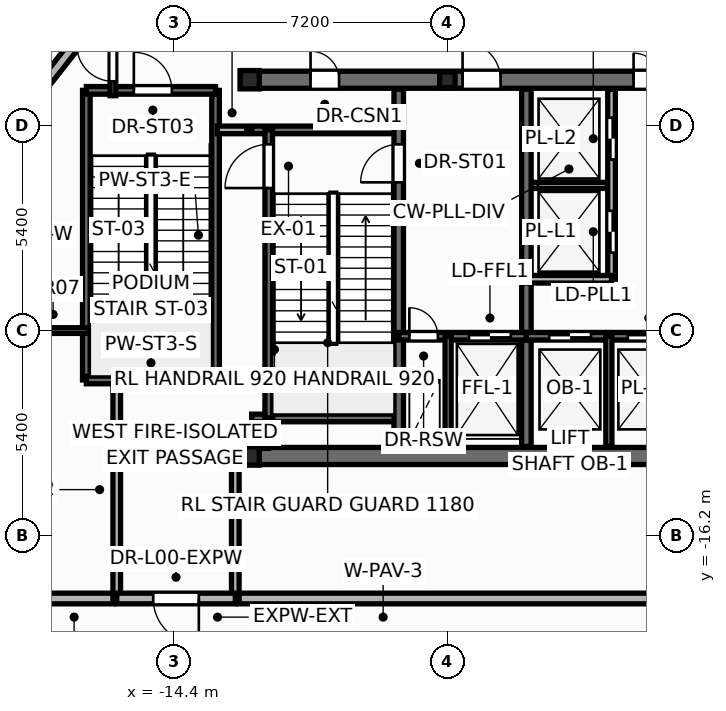
"""IFC4 building model, lengths in metres.
Left out: names, types, materials, properties, quantities, classifications, styles, units other than length and angle.
Written with IfcOpenShell. Run it as: python <this file> out.ifc"""

import sys

from ifc_helpers import new_model, si_unit, direction, frame, frame_2d, origin, origin_2d, place, context, subcontext, project, spatial, rectangle, i_section, extrude, element, fill, save


model = new_model("IFC4")
c1 = context("Model", 3, precision=1e-05, world=origin(), true_north=direction((0.0, 1.0)))
c2 = subcontext(c1, "Body", "Model", "MODEL_VIEW")
j1 = project(units=[si_unit("LENGTHUNIT", "METRE"), si_unit("PLANEANGLEUNIT", "RADIAN")], contexts=[c1])
p1 = place(None, origin())
s1 = spatial("IfcSite", under=j1, at=p1, CompositionType="ELEMENT")
p2 = place(p1, origin())
s2 = spatial("IfcBuilding", under=s1, at=p2, CompositionType="ELEMENT")
p3 = place(p2, origin())
s3 = spatial("IfcBuildingStorey", under=s2, at=p3, CompositionType="ELEMENT", Elevation=0.0)
for number, where, z_axis, x_axis in (
    (1, (-12.4, -14.1, 0.0), (0.0, 0.0, 1.0), (1.0, 0.0, 0.0)),
    (2, (-12.4, -4.2, 0.0), (0.0, 0.0, 1.0), (1.0, 0.0, 0.0)),
):
    element("IfcColumn", number, at=place(p3, frame(where, z_axis=z_axis, x_axis=x_axis)), inside=s3, PredefinedType="COLUMN", context=c2, shape_type="SweptSolid", body=[
        extrude(i_section(OverallWidth=0.5, OverallDepth=0.482, WebThickness=0.04, FlangeThickness=0.045, at=origin_2d()), origin(), (0.0, 0.0, 1.0), 5.4),
    ])
p4 = place(p3, frame((-7.2, -4.2, 0.0), z_axis=(0.0, 0.0, 1.0), x_axis=(1.0, 0.0, 0.0)))
e3 = element("IfcColumn", 3, at=p4, inside=s3, PredefinedType="PILASTER", context=c2, shape_type="SweptSolid", body=[
    extrude(i_section(OverallWidth=0.405, OverallDepth=0.414, WebThickness=0.022, FlangeThickness=0.032, at=origin_2d()), origin(), (0.0, 0.0, 1.0), 5.4),
])
p5 = place(p3, frame((-15.98, -17.85, -0.015), z_axis=(0.0, 0.0, 1.0), x_axis=(-1.0, 0.0, 0.0)))
e4 = element("IfcWall", 4, at=p5, inside=s3, PredefinedType="STANDARD", context=c2, shape_type="SweptSolid", body=[
    extrude(rectangle(XDim=2.083, YDim=0.28, at=frame_2d((1.042, 0.0))), origin(), (0.0, 0.0, 1.0), 5.135),
])
p6 = place(p3, frame((12.7, -17.85, -0.015), z_axis=(0.0, 0.0, 1.0), x_axis=(-1.0, 0.0, 0.0)))
e5 = element("IfcWall", 5, at=p6, inside=s3, PredefinedType="STANDARD", context=c2, shape_type="SweptSolid", body=[
    extrude(rectangle(XDim=25.4, YDim=0.28, at=frame_2d((12.7, 0.0))), origin(), (0.0, 0.0, 1.0), 4.498),
])
p7 = place(p6, frame((2.97, 0.0, 0.015)))
e6 = element("IfcOpeningElement", 6, at=p7, cuts=e5, PredefinedType="OPENING", context=c2, shape_type="SweptSolid", body=[
    extrude(rectangle(XDim=2.006, YDim=2.304, at=frame_2d((1.0, 1.152))), frame((0.0, 0.15, 0.0), z_axis=(0.0, -1.0, 0.0), x_axis=(1.0, 0.0, 0.0)), (0.0, 0.0, 1.0), 0.3),
])
p8 = place(p3, frame((-23.245, -11.24, -0.015), z_axis=(0.0, 0.0, 1.0), x_axis=(0.616945483616, 0.787005889588, 0.0)))
e7 = element("IfcWall", 7, at=p8, inside=s3, PredefinedType="STANDARD", context=c2, shape_type="SweptSolid", body=[
    extrude(rectangle(XDim=28.627, YDim=0.28, at=frame_2d((14.314, 0.0))), origin(), (0.0, 0.0, 1.0), 3.91),
])
p9 = place(p3, frame((-5.12, -6.98, 0.0), z_axis=(0.0, 0.0, 1.0), x_axis=(1.0, 0.0, 0.0)))
e8 = element("IfcWall", 8, at=p9, inside=s3, PredefinedType="PARTITIONING", context=c2, shape_type="SweptSolid", body=[
    extrude(rectangle(XDim=2.24, YDim=0.16, at=frame_2d((1.12, 0.0))), origin(), (0.0, 0.0, 1.0), 5.12),
])
p10 = place(p3, frame((-12.75, -14.1, 0.0), z_axis=(0.0, 0.0, 1.0), x_axis=(1.0, 0.0, 0.0)))
e9 = element("IfcWall", 9, at=p10, inside=s3, PredefinedType="SHEAR", context=c2, shape_type="SweptSolid", body=[
    extrude(rectangle(XDim=25.5, YDim=0.45, at=frame_2d((12.75, 0.0))), origin(), (0.0, 0.0, 1.0), 5.4),
])
p11 = place(p3, frame((-12.65, -4.2, 0.0), z_axis=(0.0, 0.0, 1.0), x_axis=(1.0, 0.0, 0.0)))
e10 = element("IfcWall", 10, at=p11, inside=s3, PredefinedType="SHEAR", context=c2, shape_type="SweptSolid", body=[
    extrude(rectangle(XDim=25.3, YDim=0.45, at=frame_2d((12.65, 0.0))), origin(), (0.0, 0.0, 1.0), 5.4),
])
p12 = place(p11, frame((1.85, 0.0, 0.0)))
e11 = element("IfcOpeningElement", 11, at=p12, cuts=e10, PredefinedType="OPENING", context=c2, shape_type="SweptSolid", body=[
    extrude(rectangle(XDim=0.756, YDim=2.054, at=frame_2d((0.375, 1.027))), frame((0.0, 0.235, 0.0), z_axis=(0.0, -1.0, 0.0), x_axis=(1.0, 0.0, 0.0)), (0.0, 0.0, 1.0), 0.47),
])
p13 = place(p11, frame((22.65, 0.0, 0.0)))
e12 = element("IfcOpeningElement", 12, at=p13, cuts=e10, PredefinedType="OPENING", context=c2, shape_type="SweptSolid", body=[
    extrude(rectangle(XDim=0.756, YDim=2.054, at=frame_2d((0.375, 1.027))), frame((0.0, 0.235, 0.0), z_axis=(0.0, -1.0, 0.0), x_axis=(1.0, 0.0, 0.0)), (0.0, 0.0, 1.0), 0.47),
])
p14 = place(p11, frame((5.85, 0.0, 0.0)))
e13 = element("IfcOpeningElement", 13, at=p14, cuts=e10, PredefinedType="OPENING", context=c2, shape_type="SweptSolid", body=[
    extrude(rectangle(XDim=1.006, YDim=2.104, at=frame_2d((0.5, 1.052))), frame((0.0, 0.235, 0.0), z_axis=(0.0, -1.0, 0.0), x_axis=(1.0, 0.0, 0.0)), (0.0, 0.0, 1.0), 0.47),
])
p15 = place(p11, frame((10.35, 0.0, 0.0)))
e14 = element("IfcOpeningElement", 14, at=p15, cuts=e10, PredefinedType="OPENING", context=c2, shape_type="SweptSolid", body=[
    extrude(rectangle(XDim=1.406, YDim=2.154, at=frame_2d((0.7, 1.077))), frame((0.0, 0.235, 0.0), z_axis=(0.0, -1.0, 0.0), x_axis=(1.0, 0.0, 0.0)), (0.0, 0.0, 1.0), 0.47),
])
p16 = place(p11, frame((18.45, 0.0, 0.0)))
e15 = element("IfcOpeningElement", 15, at=p16, cuts=e10, PredefinedType="OPENING", context=c2, shape_type="SweptSolid", body=[
    extrude(rectangle(XDim=1.006, YDim=2.104, at=frame_2d((0.5, 1.052))), frame((0.0, 0.235, 0.0), z_axis=(0.0, -1.0, 0.0), x_axis=(1.0, 0.0, 0.0)), (0.0, 0.0, 1.0), 0.47),
])
for number, where, z_axis, x_axis in (
    (16, (-12.35, -5.52, 0.0), (0.0, 0.0, 1.0), (1.0, 0.0, 0.0)),
    (17, (-12.35, -13.1, 0.0), (0.0, 0.0, 1.0), (1.0, 0.0, 0.0)),
):
    element("IfcWall", number, at=place(p3, frame(where, z_axis=z_axis, x_axis=x_axis)), inside=s3, PredefinedType="SOLIDWALL", context=c2, shape_type="SweptSolid", body=[
        extrude(rectangle(XDim=3.87, YDim=0.2, at=frame_2d((1.935, 0.0))), origin(), (0.0, 0.0, 1.0), 5.4),
    ])
p17 = place(p3, frame((-11.9, -13.1, 0.0), z_axis=(0.0, 0.0, 1.0), x_axis=(0.0, 1.0, 0.0)))
e18 = element("IfcWall", 18, at=p17, inside=s3, PredefinedType="SOLIDWALL", context=c2, shape_type="SweptSolid", body=[
    extrude(rectangle(XDim=7.58, YDim=0.2, at=frame_2d((3.79, 0.0))), origin(), (0.0, 0.0, 1.0), 5.4),
])
p18 = place(p17, frame((6.05, 0.0, 0.0)))
e19 = element("IfcOpeningElement", 19, at=p18, cuts=e18, PredefinedType="OPENING", context=c2, shape_type="SweptSolid", body=[
    extrude(rectangle(XDim=1.156, YDim=2.154, at=frame_2d((0.575, 1.077))), frame((0.0, 0.11, 0.0), z_axis=(0.0, -1.0, 0.0), x_axis=(1.0, 0.0, 0.0)), (0.0, 0.0, 1.0), 0.22),
])
p19 = place(p3, frame((-8.48, -13.85, 0.0), z_axis=(0.0, 0.0, 1.0), x_axis=(0.0, 1.0, 0.0)))
e20 = element("IfcWall", 20, at=p19, inside=s3, PredefinedType="SHEAR", context=c2, shape_type="SweptSolid", body=[
    extrude(rectangle(XDim=9.4, YDim=0.25, at=frame_2d((4.7, 0.0))), origin(), (0.0, 0.0, 1.0), 5.4),
])
p20 = place(p19, frame((6.95, 0.0, 0.0)))
e21 = element("IfcOpeningElement", 21, at=p20, cuts=e20, PredefinedType="OPENING", context=c2, shape_type="SweptSolid", body=[
    extrude(rectangle(XDim=1.006, YDim=2.104, at=frame_2d((0.5, 1.052))), frame((0.0, 0.135, 0.0), z_axis=(0.0, -1.0, 0.0), x_axis=(1.0, 0.0, 0.0)), (0.0, 0.0, 1.0), 0.27),
])
p21 = place(p3, frame((-5.12, -13.85, 0.0), z_axis=(0.0, 0.0, 1.0), x_axis=(0.0, 1.0, 0.0)))
e22 = element("IfcWall", 22, at=p21, inside=s3, PredefinedType="SHEAR", context=c2, shape_type="SweptSolid", body=[
    extrude(rectangle(XDim=9.4, YDim=0.25, at=frame_2d((4.7, 0.0))), origin(), (0.0, 0.0, 1.0), 5.4),
])
p22 = place(p3, frame((-8.48, -10.95, 0.0), z_axis=(0.0, 0.0, 1.0), x_axis=(1.0, 0.0, 0.0)))
e23 = element("IfcWall", 23, at=p22, inside=s3, PredefinedType="SOLIDWALL", context=c2, shape_type="SweptSolid", body=[
    extrude(rectangle(XDim=3.36, YDim=0.2, at=frame_2d((1.68, 0.0))), origin(), (0.0, 0.0, 1.0), 5.4),
])
p23 = place(p22, frame((0.28, 0.0, 0.0)))
e24 = element("IfcOpeningElement", 24, at=p23, cuts=e23, PredefinedType="OPENING", context=c2, shape_type="SweptSolid", body=[
    extrude(rectangle(XDim=0.756, YDim=2.054, at=frame_2d((0.375, 1.027))), frame((0.0, 0.11, 0.0), z_axis=(0.0, -1.0, 0.0), x_axis=(1.0, 0.0, 0.0)), (0.0, 0.0, 1.0), 0.22),
])
p24 = place(p22, frame((1.85, 0.0, 0.0)))
e25 = element("IfcOpeningElement", 25, at=p24, cuts=e23, PredefinedType="OPENING", context=c2, shape_type="SweptSolid", body=[
    extrude(rectangle(XDim=1.106, YDim=2.104, at=frame_2d((0.55, 1.052))), frame((0.0, 0.11, 0.0), z_axis=(0.0, -1.0, 0.0), x_axis=(1.0, 0.0, 0.0)), (0.0, 0.0, 1.0), 0.22),
])
p25 = place(p3, frame((-5.12, -10.95, 0.0), z_axis=(0.0, 0.0, 1.0), x_axis=(1.0, 0.0, 0.0)))
e26 = element("IfcWall", 26, at=p25, inside=s3, PredefinedType="SOLIDWALL", context=c2, shape_type="SweptSolid", body=[
    extrude(rectangle(XDim=10.24, YDim=0.2, at=frame_2d((5.12, 0.0))), origin(), (0.0, 0.0, 1.0), 5.4),
])
p26 = place(p25, frame((0.6, 0.0, 0.0)))
e27 = element("IfcOpeningElement", 27, at=p26, cuts=e26, PredefinedType="OPENING", context=c2, shape_type="SweptSolid", body=[
    extrude(rectangle(XDim=1.106, YDim=2.104, at=frame_2d((0.55, 1.052))), frame((0.0, 0.11, 0.0), z_axis=(0.0, -1.0, 0.0), x_axis=(1.0, 0.0, 0.0)), (0.0, 0.0, 1.0), 0.22),
])
p27 = place(p25, frame((2.67, 0.0, 0.0)))
e28 = element("IfcOpeningElement", 28, at=p27, cuts=e26, PredefinedType="OPENING", context=c2, shape_type="SweptSolid", body=[
    extrude(rectangle(XDim=1.106, YDim=2.104, at=frame_2d((0.55, 1.052))), frame((0.0, 0.11, 0.0), z_axis=(0.0, -1.0, 0.0), x_axis=(1.0, 0.0, 0.0)), (0.0, 0.0, 1.0), 0.22),
])
p28 = place(p25, frame((4.57, 0.0, 0.0)))
e29 = element("IfcOpeningElement", 29, at=p28, cuts=e26, PredefinedType="OPENING", context=c2, shape_type="SweptSolid", body=[
    extrude(rectangle(XDim=1.106, YDim=2.104, at=frame_2d((0.55, 1.052))), frame((0.0, 0.11, 0.0), z_axis=(0.0, -1.0, 0.0), x_axis=(1.0, 0.0, 0.0)), (0.0, 0.0, 1.0), 0.22),
])
p29 = place(p25, frame((6.47, 0.0, 0.0)))
e30 = element("IfcOpeningElement", 30, at=p29, cuts=e26, PredefinedType="OPENING", context=c2, shape_type="SweptSolid", body=[
    extrude(rectangle(XDim=1.106, YDim=2.104, at=frame_2d((0.55, 1.052))), frame((0.0, 0.11, 0.0), z_axis=(0.0, -1.0, 0.0), x_axis=(1.0, 0.0, 0.0)), (0.0, 0.0, 1.0), 0.22),
])
p30 = place(p25, frame((8.54, 0.0, 0.0)))
e31 = element("IfcOpeningElement", 31, at=p30, cuts=e26, PredefinedType="OPENING", context=c2, shape_type="SweptSolid", body=[
    extrude(rectangle(XDim=1.106, YDim=2.104, at=frame_2d((0.55, 1.052))), frame((0.0, 0.11, 0.0), z_axis=(0.0, -1.0, 0.0), x_axis=(1.0, 0.0, 0.0)), (0.0, 0.0, 1.0), 0.22),
])
for number, where, z_axis, x_axis in (
    (32, (-7.18, -13.85, 0.0), (0.0, 0.0, 1.0), (0.0, 1.0, 0.0)),
    (33, (-2.95, -13.85, 0.0), (0.0, 0.0, 1.0), (0.0, 1.0, 0.0)),
):
    element("IfcWall", number, at=place(p3, frame(where, z_axis=z_axis, x_axis=x_axis)), inside=s3, PredefinedType="PARTITIONING", context=c2, shape_type="SweptSolid", body=[
        extrude(rectangle(XDim=2.9, YDim=0.16, at=frame_2d((1.45, 0.0))), origin(), (0.0, 0.0, 1.0), 4.145),
    ])
p31 = place(p3, frame((-2.88, -9.45, 0.0), z_axis=(0.0, 0.0, 1.0), x_axis=(0.0, 1.0, 0.0)))
e34 = element("IfcWall", 34, at=p31, inside=s3, PredefinedType="SOLIDWALL", context=c2, shape_type="SweptSolid", body=[
    extrude(rectangle(XDim=5.0, YDim=0.2, at=frame_2d((2.5, 0.0))), origin(), (0.0, 0.0, 1.0), 5.12),
])
p32 = place(p31, frame((0.7, 0.0, 0.0)))
e35 = element("IfcOpeningElement", 35, at=p32, cuts=e34, PredefinedType="OPENING", context=c2, shape_type="SweptSolid", body=[
    extrude(rectangle(XDim=1.106, YDim=2.104, at=frame_2d((0.55, 1.052))), frame((0.0, 0.11, 0.0), z_axis=(0.0, -1.0, 0.0), x_axis=(1.0, 0.0, 0.0)), (0.0, 0.0, 1.0), 0.22),
])
p33 = place(p31, frame((3.15, 0.0, 0.0)))
e36 = element("IfcOpeningElement", 36, at=p33, cuts=e34, PredefinedType="OPENING", context=c2, shape_type="SweptSolid", body=[
    extrude(rectangle(XDim=1.106, YDim=2.104, at=frame_2d((0.55, 1.052))), frame((0.0, 0.11, 0.0), z_axis=(0.0, -1.0, 0.0), x_axis=(1.0, 0.0, 0.0)), (0.0, 0.0, 1.0), 0.22),
])
p34 = place(p3, frame((-5.12, -9.45, 0.0), z_axis=(0.0, 0.0, 1.0), x_axis=(1.0, 0.0, 0.0)))
e37 = element("IfcWall", 37, at=p34, inside=s3, PredefinedType="SOLIDWALL", context=c2, shape_type="SweptSolid", body=[
    extrude(rectangle(XDim=2.24, YDim=0.2, at=frame_2d((1.12, 0.0))), origin(), (0.0, 0.0, 1.0), 5.12),
])
for number, where, z_axis, x_axis in (
    (38, (-16.7, -12.1, 0.0), (0.0, 0.0, 1.0), (0.0, 1.0, 0.0)),
    (39, (-13.3, -12.1, 0.0), (0.0, 0.0, 1.0), (0.0, 1.0, 0.0)),
):
    element("IfcWall", number, at=place(p3, frame(where, z_axis=z_axis, x_axis=x_axis)), inside=s3, PredefinedType="SOLIDWALL", context=c2, shape_type="SweptSolid", body=[
        extrude(rectangle(XDim=7.62, YDim=0.2, at=frame_2d((3.81, 0.0))), origin(), (0.0, 0.0, 1.0), 5.4),
    ])
p35 = place(p3, frame((-22.862, -10.8, 0.0), z_axis=(0.0, 0.0, 1.0), x_axis=(1.0, 0.0, 0.0)))
e40 = element("IfcWall", 40, at=p35, inside=s3, PredefinedType="PARTITIONING", context=c2, shape_type="SweptSolid", body=[
    extrude(rectangle(XDim=6.222, YDim=0.15, at=frame_2d((3.111, 0.0))), origin(), (0.0, 0.0, 1.0), 5.12),
])
p36 = place(p35, frame((0.758, 0.0, 0.0)))
e41 = element("IfcOpeningElement", 41, at=p36, cuts=e40, PredefinedType="OPENING", context=c2, shape_type="SweptSolid", body=[
    extrude(rectangle(XDim=0.956, YDim=2.104, at=frame_2d((0.475, 1.052))), frame((0.0, 0.085, 0.0), z_axis=(0.0, -1.0, 0.0), x_axis=(1.0, 0.0, 0.0)), (0.0, 0.0, 1.0), 0.17),
])
p37 = place(p3, frame((-15.9, -17.85, 0.0), z_axis=(0.0, 0.0, 1.0), x_axis=(0.0, 1.0, 0.0)))
e42 = element("IfcWall", 42, at=p37, inside=s3, PredefinedType="SOLIDWALL", context=c2, shape_type="SweptSolid", body=[
    extrude(rectangle(XDim=5.73, YDim=0.2, at=frame_2d((2.865, 0.0))), origin(), (0.0, 0.0, 1.0), 5.12),
])
p38 = place(p3, frame((-12.78, -17.85, 0.0), z_axis=(0.0, 0.0, 1.0), x_axis=(0.0, 1.0, 0.0)))
e43 = element("IfcWall", 43, at=p38, inside=s3, PredefinedType="SOLIDWALL", context=c2, shape_type="SweptSolid", body=[
    extrude(rectangle(XDim=4.05, YDim=0.2, at=frame_2d((2.025, 0.0))), origin(), (0.0, 0.0, 1.0), 5.12),
])
p39 = place(p3, frame((-16.7, -12.1, 0.0), z_axis=(0.0, 0.0, 1.0), x_axis=(1.0, 0.0, 0.0)))
e44 = element("IfcWall", 44, at=p39, inside=s3, PredefinedType="SOLIDWALL", context=c2, shape_type="SweptSolid", body=[
    extrude(rectangle(XDim=3.4, YDim=0.2, at=frame_2d((1.7, 0.0))), origin(), (0.0, 0.0, 1.0), 5.4),
])
p40 = place(p3, frame((-16.7, -4.48, 0.0), z_axis=(0.0, 0.0, 1.0), x_axis=(1.0, 0.0, 0.0)))
e45 = element("IfcWall", 45, at=p40, inside=s3, PredefinedType="SOLIDWALL", context=c2, shape_type="SweptSolid", body=[
    extrude(rectangle(XDim=3.4, YDim=0.2, at=frame_2d((1.7, 0.0))), origin(), (0.0, 0.0, 1.0), 5.4),
])
p41 = place(p40, frame((1.25, 0.0, 0.0)))
e46 = element("IfcOpeningElement", 46, at=p41, cuts=e45, PredefinedType="OPENING", context=c2, shape_type="SweptSolid", body=[
    extrude(rectangle(XDim=1.006, YDim=2.104, at=frame_2d((0.5, 1.052))), frame((0.0, 0.11, 0.0), z_axis=(0.0, -1.0, 0.0), x_axis=(1.0, 0.0, 0.0)), (0.0, 0.0, 1.0), 0.22),
])
p42 = place(p3, frame((-12.78, -17.85, 0.0), z_axis=(0.0, 0.0, 1.0), x_axis=(-1.0, 0.0, 0.0)))
e47 = element("IfcWall", 47, at=p42, inside=s3, PredefinedType="STANDARD", context=c2, shape_type="SweptSolid", body=[
    extrude(rectangle(XDim=3.12, YDim=0.28, at=frame_2d((1.56, 0.0))), origin(), (0.0, 0.0, 1.0), 5.12),
])
p43 = place(p42, frame((0.96, 0.0, 0.0)))
e48 = element("IfcOpeningElement", 48, at=p43, cuts=e47, PredefinedType="OPENING", context=c2, shape_type="SweptSolid", body=[
    extrude(rectangle(XDim=1.206, YDim=2.154, at=frame_2d((0.6, 1.077))), frame((0.0, 0.15, 0.0), z_axis=(0.0, -1.0, 0.0), x_axis=(1.0, 0.0, 0.0)), (0.0, 0.0, 1.0), 0.3),
])
p44 = place(p3, frame((-16.0, -4.62, 0.0), z_axis=(0.0, 0.0, 1.0), x_axis=(0.0, 1.0, 0.0)))
e49 = element("IfcWall", 49, at=p44, inside=s3, PredefinedType="PARTITIONING", context=c2, shape_type="SweptSolid", body=[
    extrude(rectangle(XDim=2.573, YDim=0.15, at=frame_2d((1.287, 0.0))), origin(), (0.0, 0.0, 1.0), 5.12),
])
p45 = place(p44, frame((0.379, 0.0, 0.0)))
e50 = element("IfcOpeningElement", 50, at=p45, cuts=e49, PredefinedType="OPENING", context=c2, shape_type="SweptSolid", body=[
    extrude(rectangle(XDim=0.956, YDim=2.104, at=frame_2d((0.475, 1.052))), frame((0.0, 0.085, 0.0), z_axis=(0.0, -1.0, 0.0), x_axis=(1.0, 0.0, 0.0)), (0.0, 0.0, 1.0), 0.17),
])
p46 = place(p3, frame((-12.78, -13.8, 0.0), z_axis=(0.0, 0.0, 1.0), x_axis=(1.0, 0.0, 0.0)))
e51 = element("IfcWall", 51, at=p46, inside=s3, PredefinedType="SOLIDWALL", context=c2, shape_type="SweptSolid", body=[
    extrude(rectangle(XDim=0.88, YDim=0.2, at=frame_2d((0.44, 0.0))), origin(), (0.0, 0.0, 1.0), 4.483),
])
p47 = place(p3, frame((-13.25, -5.52, 0.0), z_axis=(0.0, 0.0, 1.0), x_axis=(1.0, 0.0, 0.0)))
e52 = element("IfcWall", 52, at=p47, inside=s3, PredefinedType="SOLIDWALL", context=c2, shape_type="SweptSolid", body=[
    extrude(rectangle(XDim=0.77, YDim=0.2, at=frame_2d((0.385, 0.0))), origin(), (0.0, 0.0, 1.0), 4.483),
])
p48 = place(p3, frame((-11.9, -13.8, 0.0), z_axis=(0.0, 0.0, 1.0), x_axis=(0.0, 1.0, 0.0)))
e53 = element("IfcWall", 53, at=p48, inside=s3, PredefinedType="SOLIDWALL", context=c2, shape_type="SweptSolid", body=[
    extrude(rectangle(XDim=0.7, YDim=0.2, at=frame_2d((0.35, 0.0))), origin(), (0.0, 0.0, 1.0), 5.12),
])
p49 = place(p32, origin())
e54 = element("IfcDoor", 54, at=p49, inside=s3, OperationType="DOUBLE_DOOR_SLIDING", PredefinedType="DOOR", context=c2, shape_type="SweptSolid", body=[
    extrude(rectangle(XDim=1.1, YDim=2.1, at=frame_2d((0.55, 1.05))), frame((0.0, 0.025, 0.0), z_axis=(0.0, -1.0, 0.0), x_axis=(1.0, 0.0, 0.0)), (0.0, 0.0, 1.0), 0.05),
])
fill(e35, e54)
p50 = place(p33, origin())
e55 = element("IfcDoor", 55, at=p50, inside=s3, OperationType="DOUBLE_DOOR_SLIDING", PredefinedType="DOOR", context=c2, shape_type="SweptSolid", body=[
    extrude(rectangle(XDim=1.1, YDim=2.1, at=frame_2d((0.55, 1.05))), frame((0.0, 0.025, 0.0), z_axis=(0.0, -1.0, 0.0), x_axis=(1.0, 0.0, 0.0)), (0.0, 0.0, 1.0), 0.05),
])
fill(e36, e55)
p51 = place(p20, origin())
e56 = element("IfcDoor", 56, at=p51, inside=s3, OperationType="SINGLE_SWING_LEFT", PredefinedType="DOOR", context=c2, shape_type="SweptSolid", body=[
    extrude(rectangle(XDim=1.0, YDim=2.1, at=frame_2d((0.5, 1.05))), frame((0.0, 0.025, 0.0), z_axis=(0.0, -1.0, 0.0), x_axis=(1.0, 0.0, 0.0)), (0.0, 0.0, 1.0), 0.05),
])
fill(e21, e56)
p52 = place(p18, origin())
e57 = element("IfcDoor", 57, at=p52, inside=s3, OperationType="SINGLE_SWING_LEFT", PredefinedType="DOOR", context=c2, shape_type="SweptSolid", body=[
    extrude(rectangle(XDim=1.15, YDim=2.15, at=frame_2d((0.575, 1.075))), frame((0.0, 0.025, 0.0), z_axis=(0.0, -1.0, 0.0), x_axis=(1.0, 0.0, 0.0)), (0.0, 0.0, 1.0), 0.05),
])
fill(e19, e57)
p53 = place(p23, origin())
e58 = element("IfcDoor", 58, at=p53, inside=s3, OperationType="SINGLE_SWING_LEFT", PredefinedType="DOOR", context=c2, shape_type="SweptSolid", body=[
    extrude(rectangle(XDim=0.75, YDim=2.05, at=frame_2d((0.375, 1.025))), frame((0.0, 0.025, 0.0), z_axis=(0.0, -1.0, 0.0), x_axis=(1.0, 0.0, 0.0)), (0.0, 0.0, 1.0), 0.05),
])
fill(e24, e58)
p54 = place(p24, origin())
e59 = element("IfcDoor", 59, at=p54, inside=s3, OperationType="DOUBLE_DOOR_SLIDING", PredefinedType="DOOR", context=c2, shape_type="SweptSolid", body=[
    extrude(rectangle(XDim=1.1, YDim=2.1, at=frame_2d((0.55, 1.05))), frame((0.0, 0.025, 0.0), z_axis=(0.0, -1.0, 0.0), x_axis=(1.0, 0.0, 0.0)), (0.0, 0.0, 1.0), 0.05),
])
fill(e25, e59)
p55 = place(p26, origin())
e60 = element("IfcDoor", 60, at=p55, inside=s3, OperationType="DOUBLE_DOOR_SLIDING", PredefinedType="DOOR", context=c2, shape_type="SweptSolid", body=[
    extrude(rectangle(XDim=1.1, YDim=2.1, at=frame_2d((0.55, 1.05))), frame((0.0, 0.025, 0.0), z_axis=(0.0, -1.0, 0.0), x_axis=(1.0, 0.0, 0.0)), (0.0, 0.0, 1.0), 0.05),
])
fill(e27, e60)
p56 = place(p27, origin())
e61 = element("IfcDoor", 61, at=p56, inside=s3, OperationType="DOUBLE_DOOR_SLIDING", PredefinedType="DOOR", context=c2, shape_type="SweptSolid", body=[
    extrude(rectangle(XDim=1.1, YDim=2.1, at=frame_2d((0.55, 1.05))), frame((0.0, 0.025, 0.0), z_axis=(0.0, -1.0, 0.0), x_axis=(1.0, 0.0, 0.0)), (0.0, 0.0, 1.0), 0.05),
])
fill(e28, e61)
p57 = place(p12, origin())
e62 = element("IfcDoor", 62, at=p57, inside=s3, OperationType="SINGLE_SWING_LEFT", PredefinedType="DOOR", context=c2, shape_type="SweptSolid", body=[
    extrude(rectangle(XDim=0.75, YDim=2.05, at=frame_2d((0.375, 1.025))), frame((0.0, 0.025, 0.0), z_axis=(0.0, -1.0, 0.0), x_axis=(1.0, 0.0, 0.0)), (0.0, 0.0, 1.0), 0.05),
])
fill(e11, e62)
p58 = place(p14, origin())
e63 = element("IfcDoor", 63, at=p58, inside=s3, OperationType="SINGLE_SWING_LEFT", PredefinedType="DOOR", context=c2, shape_type="SweptSolid", body=[
    extrude(rectangle(XDim=1.0, YDim=2.1, at=frame_2d((0.5, 1.05))), frame((0.0, 0.025, 0.0), z_axis=(0.0, -1.0, 0.0), x_axis=(1.0, 0.0, 0.0)), (0.0, 0.0, 1.0), 0.05),
])
fill(e13, e63)
p59 = place(p15, origin())
e64 = element("IfcDoor", 64, at=p59, inside=s3, OperationType="DOUBLE_DOOR_SINGLE_SWING", PredefinedType="DOOR", context=c2, shape_type="SweptSolid", body=[
    extrude(rectangle(XDim=1.4, YDim=2.15, at=frame_2d((0.7, 1.075))), frame((0.0, 0.025, 0.0), z_axis=(0.0, -1.0, 0.0), x_axis=(1.0, 0.0, 0.0)), (0.0, 0.0, 1.0), 0.05),
])
fill(e14, e64)
p60 = place(p41, origin())
e65 = element("IfcDoor", 65, at=p60, inside=s3, OperationType="SINGLE_SWING_LEFT", PredefinedType="DOOR", context=c2, shape_type="SweptSolid", body=[
    extrude(rectangle(XDim=1.0, YDim=2.1, at=frame_2d((0.5, 1.05))), frame((0.0, 0.025, 0.0), z_axis=(0.0, -1.0, 0.0), x_axis=(1.0, 0.0, 0.0)), (0.0, 0.0, 1.0), 0.05),
])
fill(e46, e65)
p61 = place(p43, origin())
e66 = element("IfcDoor", 66, at=p61, inside=s3, OperationType="SINGLE_SWING_LEFT", PredefinedType="DOOR", context=c2, shape_type="SweptSolid", body=[
    extrude(rectangle(XDim=1.2, YDim=2.15, at=frame_2d((0.6, 1.075))), frame((0.0, 0.025, 0.0), z_axis=(0.0, -1.0, 0.0), x_axis=(1.0, 0.0, 0.0)), (0.0, 0.0, 1.0), 0.05),
])
fill(e48, e66)
p62 = place(p45, origin())
e67 = element("IfcDoor", 67, at=p62, inside=s3, OperationType="SINGLE_SWING_RIGHT", PredefinedType="DOOR", context=c2, shape_type="SweptSolid", body=[
    extrude(rectangle(XDim=0.95, YDim=2.1, at=frame_2d((0.475, 1.05))), frame((0.0, 0.025, 0.0), z_axis=(0.0, -1.0, 0.0), x_axis=(1.0, 0.0, 0.0)), (0.0, 0.0, 1.0), 0.05),
])
fill(e50, e67)
save(model, sys.argv[1])
